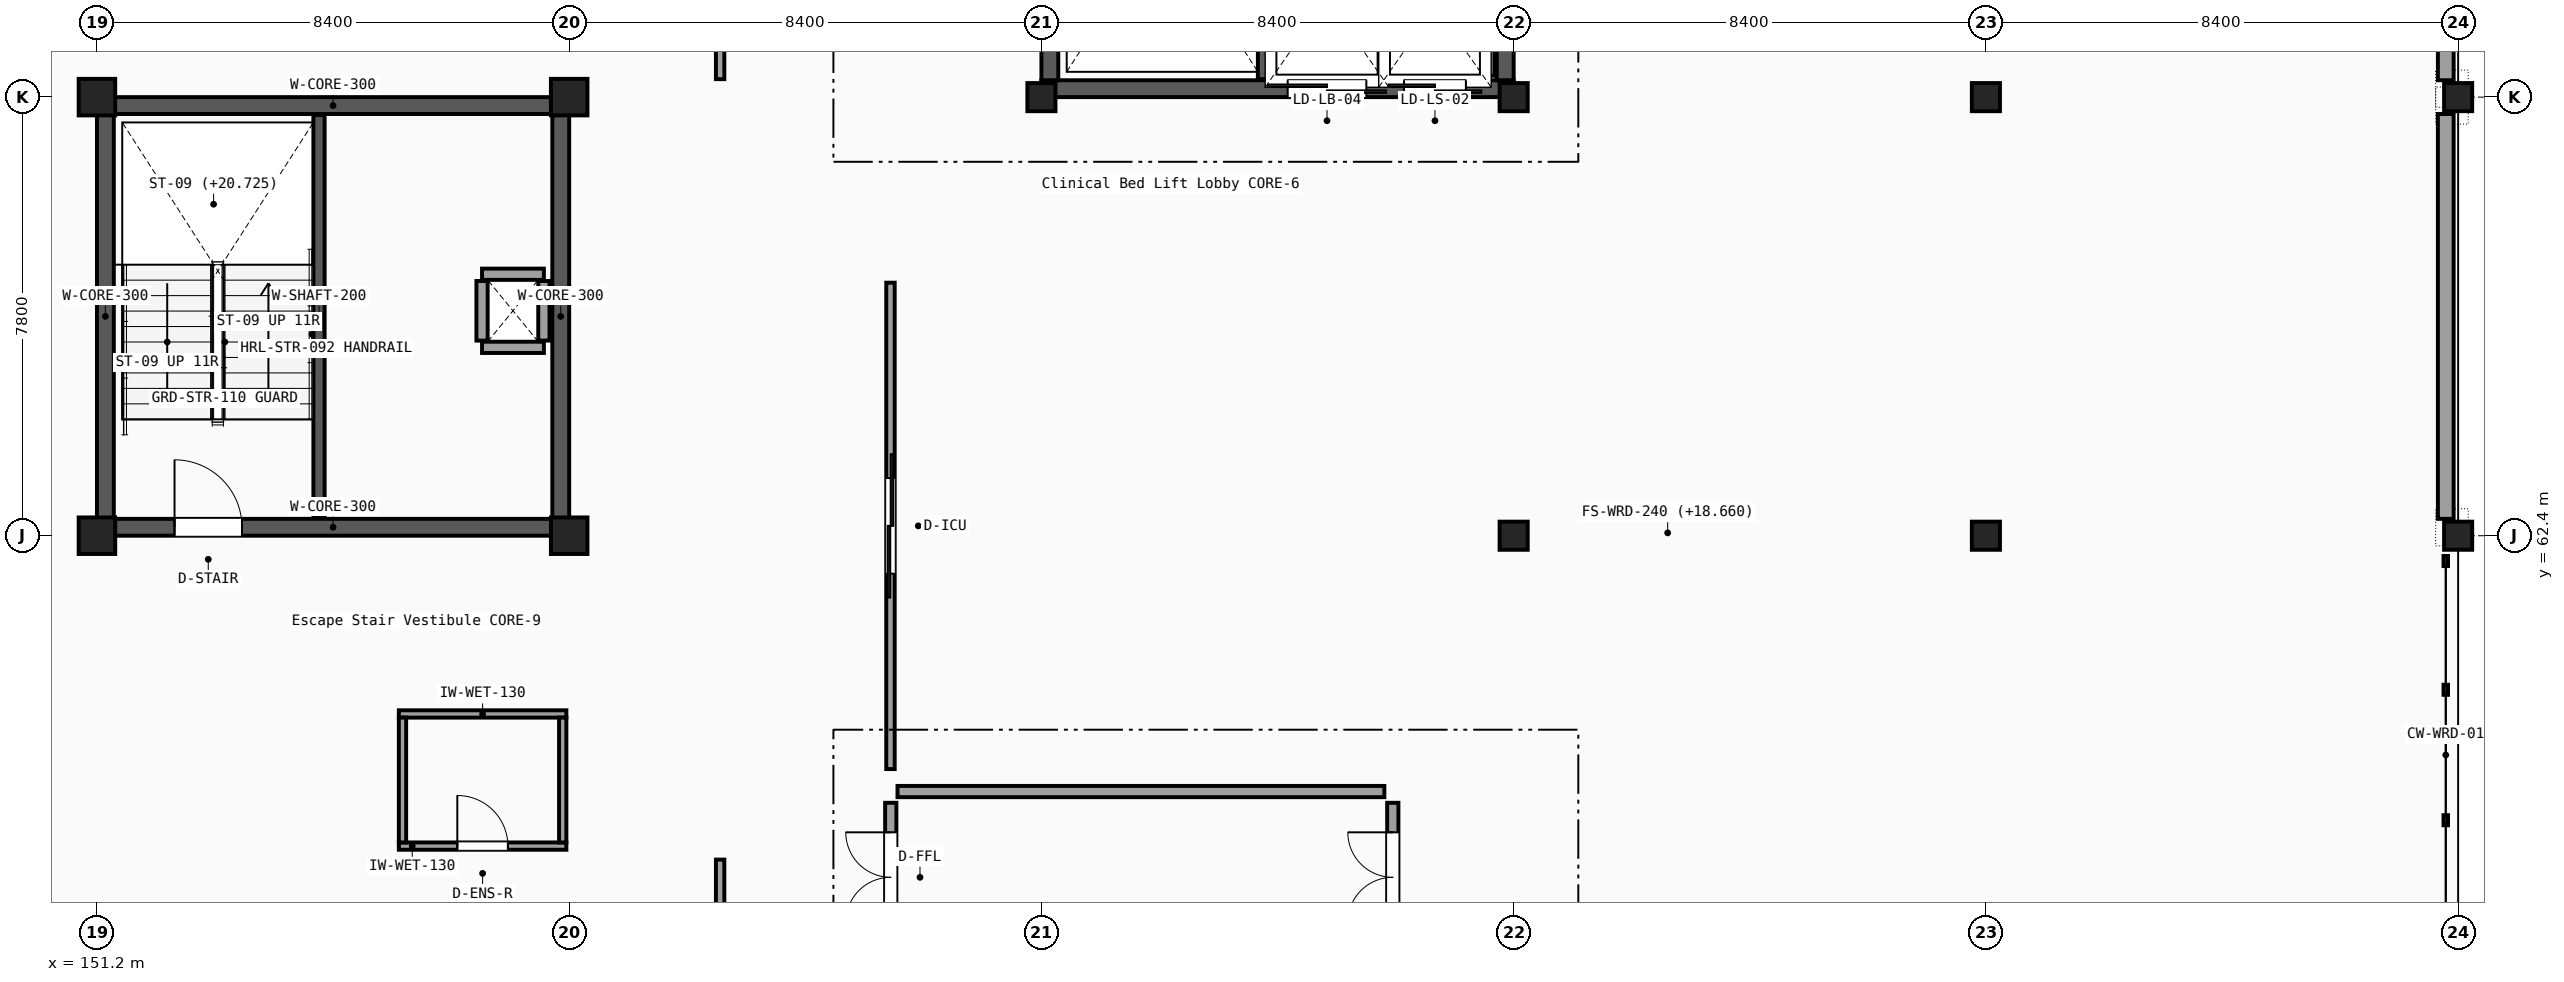
"""IFC4 building model, lengths in metres.
Left out: names, types, materials, properties, quantities, classifications, styles, units other than length and angle.
Written with IfcOpenShell. Run it as: python <this file> out.ifc"""

import sys

from ifc_helpers import new_model, si_unit, direction, frame, frame_2d, origin, origin_2d, place, context, subcontext, project, spatial, rectangle, i_section, extrude, element, fill, save


model = new_model("IFC4")
c1 = context("Model", 3, precision=1e-05, world=origin(), true_north=direction((0.0, 1.0)))
c2 = subcontext(c1, "Body", "Model", "MODEL_VIEW")
j1 = project(units=[si_unit("LENGTHUNIT", "METRE"), si_unit("PLANEANGLEUNIT", "RADIAN")], contexts=[c1])
p1 = place(None, origin())
s1 = spatial("IfcSite", under=j1, at=p1, CompositionType="ELEMENT")
p2 = place(p1, origin())
s2 = spatial("IfcBuilding", under=s1, at=p2, CompositionType="ELEMENT")
p3 = place(p2, frame((0.0, 0.0, 18.9)))
s3 = spatial("IfcBuildingStorey", under=s2, at=p3, CompositionType="ELEMENT", Elevation=18.9)
for number, where, z_axis, x_axis in (
    (1, (151.2, 62.4, 0.0), (0.0, 0.0, 1.0), (1.0, 0.0, 0.0)),
    (2, (151.2, 70.2, 0.0), (0.0, 0.0, 1.0), (1.0, 0.0, 0.0)),
    (3, (159.6, 62.4, 0.0), (0.0, 0.0, 1.0), (1.0, 0.0, 0.0)),
    (4, (159.6, 70.2, 0.0), (0.0, 0.0, 1.0), (1.0, 0.0, 0.0)),
):
    element("IfcColumn", number, at=place(p3, frame(where, z_axis=z_axis, x_axis=x_axis)), inside=s3, PredefinedType="COLUMN", context=c2, shape_type="SweptSolid", body=[
        extrude(rectangle(XDim=0.65, YDim=0.65, at=origin_2d()), origin(), (0.0, 0.0, 1.0), 4.05),
    ])
for number, where, z_axis, x_axis in (
    (5, (168.0, 70.2, 0.0), (0.0, 0.0, 1.0), (1.0, 0.0, 0.0)),
    (6, (176.4, 62.4, 0.0), (0.0, 0.0, 1.0), (1.0, 0.0, 0.0)),
    (7, (176.4, 70.2, 0.0), (0.0, 0.0, 1.0), (1.0, 0.0, 0.0)),
    (8, (184.8, 62.4, 0.0), (0.0, 0.0, 1.0), (1.0, 0.0, 0.0)),
    (9, (184.8, 70.2, 0.0), (0.0, 0.0, 1.0), (1.0, 0.0, 0.0)),
    (10, (193.2, 62.4, 0.0), (0.0, 0.0, 1.0), (1.0, 0.0, 0.0)),
    (11, (193.2, 70.2, 0.0), (0.0, 0.0, 1.0), (1.0, 0.0, 0.0)),
):
    element("IfcColumn", number, at=place(p3, frame(where, z_axis=z_axis, x_axis=x_axis)), inside=s3, PredefinedType="COLUMN", context=c2, shape_type="SweptSolid", body=[
        extrude(i_section(OverallWidth=0.3, OverallDepth=0.5, WebThickness=0.014, FlangeThickness=0.028, FilletRadius=0.027, at=origin_2d()), origin(), (0.0, 0.0, 1.0), 4.05),
    ])
p4 = place(p3, frame((192.98, 62.7, 0.0), z_axis=(0.0, 0.0, 1.0), x_axis=(0.0, 1.0, 0.0)))
e12 = element("IfcWall", 12, at=p4, inside=s3, PredefinedType="SOLIDWALL", context=c2, shape_type="SweptSolid", body=[
    extrude(rectangle(XDim=7.2, YDim=0.28, at=frame_2d((3.6, 0.0))), origin(), (0.0, 0.0, 1.0), 3.25),
])
p5 = place(p3, frame((192.98, 70.5, 0.0), z_axis=(0.0, 0.0, 1.0), x_axis=(0.0, 1.0, 0.0)))
e13 = element("IfcWall", 13, at=p5, inside=s3, PredefinedType="SOLIDWALL", context=c2, shape_type="SweptSolid", body=[
    extrude(rectangle(XDim=7.2, YDim=0.28, at=frame_2d((3.6, 0.0))), origin(), (0.0, 0.0, 1.0), 3.25),
])
p6 = place(p5, frame((2.8, 0.0, 1.15)))
e14 = element("IfcOpeningElement", 14, at=p6, cuts=e13, PredefinedType="OPENING", context=c2, shape_type="SweptSolid", body=[
    extrude(rectangle(XDim=1.6, YDim=1.3, at=frame_2d((0.8, 0.65))), frame((0.0, 0.15, 0.0), z_axis=(0.0, -1.0, 0.0), x_axis=(1.0, 0.0, 0.0)), (0.0, 0.0, 1.0), 0.3),
])
p7 = place(p3, frame((165.44, 57.85, 0.0), z_axis=(0.0, 0.0, 1.0), x_axis=(1.0, 0.0, 0.0)))
e15 = element("IfcWall", 15, at=p7, inside=s3, PredefinedType="PARTITIONING", context=c2, shape_type="SweptSolid", body=[
    extrude(rectangle(XDim=8.66, YDim=0.2, at=frame_2d((4.33, 0.0))), origin(), (0.0, 0.0, 1.0), 3.25),
])
p8 = place(p3, frame((165.32, 55.0, 0.0), z_axis=(0.0, 0.0, 1.0), x_axis=(0.0, 1.0, 0.0)))
e16 = element("IfcWall", 16, at=p8, inside=s3, PredefinedType="PARTITIONING", context=c2, shape_type="SweptSolid", body=[
    extrude(rectangle(XDim=2.65, YDim=0.2, at=frame_2d((1.325, 0.0))), origin(), (0.0, 0.0, 1.0), 3.25),
])
p9 = place(p8, frame((0.525, 0.0, 0.0)))
e17 = element("IfcOpeningElement", 17, at=p9, cuts=e16, PredefinedType="OPENING", context=c2, shape_type="SweptSolid", body=[
    extrude(rectangle(XDim=1.6, YDim=2.2, at=frame_2d((0.8, 1.1))), frame((0.0, 0.11, 0.0), z_axis=(0.0, -1.0, 0.0), x_axis=(1.0, 0.0, 0.0)), (0.0, 0.0, 1.0), 0.22),
])
p10 = place(p3, frame((174.25, 55.0, 0.0), z_axis=(0.0, 0.0, 1.0), x_axis=(0.0, 1.0, 0.0)))
e18 = element("IfcWall", 18, at=p10, inside=s3, PredefinedType="PARTITIONING", context=c2, shape_type="SweptSolid", body=[
    extrude(rectangle(XDim=2.65, YDim=0.2, at=frame_2d((1.325, 0.0))), origin(), (0.0, 0.0, 1.0), 3.25),
])
p11 = place(p10, frame((0.525, 0.0, 0.0)))
e19 = element("IfcOpeningElement", 19, at=p11, cuts=e18, PredefinedType="OPENING", context=c2, shape_type="SweptSolid", body=[
    extrude(rectangle(XDim=1.6, YDim=2.2, at=frame_2d((0.8, 1.1))), frame((0.0, 0.11, 0.0), z_axis=(0.0, -1.0, 0.0), x_axis=(1.0, 0.0, 0.0)), (0.0, 0.0, 1.0), 0.22),
])
p12 = place(p3, frame((168.0, 70.35, 0.0), z_axis=(0.0, 0.0, 1.0), x_axis=(1.0, 0.0, 0.0)))
e20 = element("IfcWall", 20, at=p12, inside=s3, PredefinedType="SHEAR", context=c2, shape_type="SweptSolid", body=[
    extrude(rectangle(XDim=8.4, YDim=0.3, at=frame_2d((4.2, 0.0))), origin(), (0.0, 0.0, 1.0), 3.82),
])
p13 = place(p12, frame((4.38, 0.0, 0.0)))
e21 = element("IfcOpeningElement", 21, at=p13, cuts=e20, PredefinedType="OPENING", context=c2, shape_type="SweptSolid", body=[
    extrude(rectangle(XDim=1.4, YDim=2.2, at=frame_2d((0.7, 1.1))), frame((0.0, 0.16, 0.0), z_axis=(0.0, -1.0, 0.0), x_axis=(1.0, 0.0, 0.0)), (0.0, 0.0, 1.0), 0.32),
])
p14 = place(p12, frame((6.45, 0.0, 0.0)))
e22 = element("IfcOpeningElement", 22, at=p14, cuts=e20, PredefinedType="OPENING", context=c2, shape_type="SweptSolid", body=[
    extrude(rectangle(XDim=1.1, YDim=2.15, at=frame_2d((0.55, 1.075))), frame((0.0, 0.16, 0.0), z_axis=(0.0, -1.0, 0.0), x_axis=(1.0, 0.0, 0.0)), (0.0, 0.0, 1.0), 0.32),
])
for number, where, z_axis, x_axis in (
    (23, (168.15, 70.5, 0.0), (0.0, 0.0, 1.0), (0.0, 1.0, 0.0)),
    (24, (176.25, 70.5, 0.0), (0.0, 0.0, 1.0), (0.0, 1.0, 0.0)),
):
    element("IfcWall", number, at=place(p3, frame(where, z_axis=z_axis, x_axis=x_axis)), inside=s3, PredefinedType="SHEAR", context=c2, shape_type="SweptSolid", body=[
        extrude(rectangle(XDim=7.2, YDim=0.3, at=frame_2d((3.6, 0.0))), origin(), (0.0, 0.0, 1.0), 3.82),
    ])
p15 = place(p3, frame((171.95, 70.52, 0.0), z_axis=(0.0, 0.0, 1.0), x_axis=(0.0, 1.0, 0.0)))
e25 = element("IfcWall", 25, at=p15, inside=s3, PredefinedType="SHEAR", context=c2, shape_type="SweptSolid", body=[
    extrude(rectangle(XDim=7.16, YDim=0.2, at=frame_2d((3.58, 0.0))), origin(), (0.0, 0.0, 1.0), 3.82),
])
p16 = place(p3, frame((174.14, 70.58, 0.0), z_axis=(0.0, 0.0, 1.0), x_axis=(0.0, 1.0, 0.0)))
e26 = element("IfcWall", 26, at=p16, inside=s3, PredefinedType="PARTITIONING", context=c2, shape_type="SweptSolid", body=[
    extrude(rectangle(XDim=2.74, YDim=0.2, at=frame_2d((1.37, 0.0))), origin(), (0.0, 0.0, 1.0), 3.25),
])
p17 = place(p3, frame((175.96, 70.58, 0.0), z_axis=(0.0, 0.0, 1.0), x_axis=(0.0, 1.0, 0.0)))
e27 = element("IfcWall", 27, at=p17, inside=s3, PredefinedType="PARTITIONING", context=c2, shape_type="SweptSolid", body=[
    extrude(rectangle(XDim=2.44, YDim=0.2, at=frame_2d((1.22, 0.0))), origin(), (0.0, 0.0, 1.0), 3.25),
])
p18 = place(p3, frame((151.2, 62.55, 0.0), z_axis=(0.0, 0.0, 1.0), x_axis=(1.0, 0.0, 0.0)))
e28 = element("IfcWall", 28, at=p18, inside=s3, PredefinedType="SHEAR", context=c2, shape_type="SweptSolid", body=[
    extrude(rectangle(XDim=8.4, YDim=0.3, at=frame_2d((4.2, 0.0))), origin(), (0.0, 0.0, 1.0), 3.82),
])
p19 = place(p18, frame((1.38, 0.0, 0.0)))
e29 = element("IfcOpeningElement", 29, at=p19, cuts=e28, PredefinedType="OPENING", context=c2, shape_type="SweptSolid", body=[
    extrude(rectangle(XDim=1.2, YDim=2.15, at=frame_2d((0.6, 1.075))), frame((0.0, 0.16, 0.0), z_axis=(0.0, -1.0, 0.0), x_axis=(1.0, 0.0, 0.0)), (0.0, 0.0, 1.0), 0.32),
])
p20 = place(p3, frame((151.2, 70.05, 0.0), z_axis=(0.0, 0.0, 1.0), x_axis=(1.0, 0.0, 0.0)))
e30 = element("IfcWall", 30, at=p20, inside=s3, PredefinedType="SHEAR", context=c2, shape_type="SweptSolid", body=[
    extrude(rectangle(XDim=8.4, YDim=0.3, at=frame_2d((4.2, 0.0))), origin(), (0.0, 0.0, 1.0), 3.82),
])
for number, where, z_axis, x_axis in (
    (31, (151.35, 62.7, 0.0), (0.0, 0.0, 1.0), (0.0, 1.0, 0.0)),
    (32, (159.45, 62.7, 0.0), (0.0, 0.0, 1.0), (0.0, 1.0, 0.0)),
):
    element("IfcWall", number, at=place(p3, frame(where, z_axis=z_axis, x_axis=x_axis)), inside=s3, PredefinedType="SHEAR", context=c2, shape_type="SweptSolid", body=[
        extrude(rectangle(XDim=7.2, YDim=0.3, at=frame_2d((3.6, 0.0))), origin(), (0.0, 0.0, 1.0), 3.82),
    ])
p21 = place(p3, frame((155.15, 62.72, 0.0), z_axis=(0.0, 0.0, 1.0), x_axis=(0.0, 1.0, 0.0)))
e33 = element("IfcWall", 33, at=p21, inside=s3, PredefinedType="SHEAR", context=c2, shape_type="SweptSolid", body=[
    extrude(rectangle(XDim=7.16, YDim=0.2, at=frame_2d((3.58, 0.0))), origin(), (0.0, 0.0, 1.0), 3.82),
])
for number, where, z_axis, x_axis in (
    (34, (158.05, 65.75, 0.0), (0.0, 0.0, 1.0), (1.0, 0.0, 0.0)),
    (35, (158.05, 67.05, 0.0), (0.0, 0.0, 1.0), (1.0, 0.0, 0.0)),
):
    element("IfcWall", number, at=place(p3, frame(where, z_axis=z_axis, x_axis=x_axis)), inside=s3, PredefinedType="PARTITIONING", context=c2, shape_type="SweptSolid", body=[
        extrude(rectangle(XDim=1.1, YDim=0.2, at=frame_2d((0.55, 0.0))), origin(), (0.0, 0.0, 1.0), 3.25),
    ])
for number, where, z_axis, x_axis in (
    (36, (158.05, 65.87, 0.0), (0.0, 0.0, 1.0), (0.0, 1.0, 0.0)),
    (37, (159.15, 65.87, 0.0), (0.0, 0.0, 1.0), (0.0, 1.0, 0.0)),
):
    element("IfcWall", number, at=place(p3, frame(where, z_axis=z_axis, x_axis=x_axis)), inside=s3, PredefinedType="PARTITIONING", context=c2, shape_type="SweptSolid", body=[
        extrude(rectangle(XDim=1.06, YDim=0.2, at=frame_2d((0.53, 0.0))), origin(), (0.0, 0.0, 1.0), 3.25),
    ])
p22 = place(p3, frame((162.285, 47.42, 0.0), z_axis=(0.0, 0.0, 1.0), x_axis=(0.0, 1.0, 0.0)))
e38 = element("IfcWall", 38, at=p22, inside=s3, PredefinedType="PARTITIONING", context=c2, shape_type="SweptSolid", body=[
    extrude(rectangle(XDim=9.22, YDim=0.15, at=frame_2d((4.61, 0.0))), origin(), (0.0, 0.0, 1.0), 3.25),
])
p23 = place(p22, frame((3.91, 0.0, 0.0)))
e39 = element("IfcOpeningElement", 39, at=p23, cuts=e38, PredefinedType="OPENING", context=c2, shape_type="SweptSolid", body=[
    extrude(rectangle(XDim=1.4, YDim=2.2, at=frame_2d((0.7, 1.1))), frame((0.0, 0.085, 0.0), z_axis=(0.0, -1.0, 0.0), x_axis=(1.0, 0.0, 0.0)), (0.0, 0.0, 1.0), 0.17),
])
p24 = place(p3, frame((156.57, 56.88, 0.0), z_axis=(0.0, 0.0, 1.0), x_axis=(1.0, 0.0, 0.0)))
e40 = element("IfcWall", 40, at=p24, inside=s3, PredefinedType="PARTITIONING", context=c2, shape_type="SweptSolid", body=[
    extrude(rectangle(XDim=2.98, YDim=0.13, at=frame_2d((1.49, 0.0))), origin(), (0.0, 0.0, 1.0), 3.53),
])
p25 = place(p24, frame((1.04, 0.0, 0.0)))
e41 = element("IfcOpeningElement", 41, at=p25, cuts=e40, PredefinedType="OPENING", context=c2, shape_type="SweptSolid", body=[
    extrude(rectangle(XDim=0.9, YDim=2.1, at=frame_2d((0.45, 1.05))), frame((0.0, 0.075, 0.0), z_axis=(0.0, -1.0, 0.0), x_axis=(1.0, 0.0, 0.0)), (0.0, 0.0, 1.0), 0.15),
])
p26 = place(p3, frame((156.57, 59.23, 0.0), z_axis=(0.0, 0.0, 1.0), x_axis=(1.0, 0.0, 0.0)))
e42 = element("IfcWall", 42, at=p26, inside=s3, PredefinedType="PARTITIONING", context=c2, shape_type="SweptSolid", body=[
    extrude(rectangle(XDim=2.98, YDim=0.13, at=frame_2d((1.49, 0.0))), origin(), (0.0, 0.0, 1.0), 3.53),
])
p27 = place(p3, frame((156.635, 56.945, 0.0), z_axis=(0.0, 0.0, 1.0), x_axis=(0.0, 1.0, 0.0)))
e43 = element("IfcWall", 43, at=p27, inside=s3, PredefinedType="PARTITIONING", context=c2, shape_type="SweptSolid", body=[
    extrude(rectangle(XDim=2.22, YDim=0.13, at=frame_2d((1.11, 0.0))), origin(), (0.0, 0.0, 1.0), 3.77),
])
p28 = place(p3, frame((159.485, 56.945, 0.0), z_axis=(0.0, 0.0, 1.0), x_axis=(0.0, 1.0, 0.0)))
e44 = element("IfcWall", 44, at=p28, inside=s3, PredefinedType="PARTITIONING", context=c2, shape_type="SweptSolid", body=[
    extrude(rectangle(XDim=2.22, YDim=0.13, at=frame_2d((1.11, 0.0))), origin(), (0.0, 0.0, 1.0), 3.53),
])
p29 = place(p3, frame((162.285, 70.52, 0.0), z_axis=(0.0, 0.0, 1.0), x_axis=(0.0, 1.0, 0.0)))
e45 = element("IfcWall", 45, at=p29, inside=s3, PredefinedType="PARTITIONING", context=c2, shape_type="SweptSolid", body=[
    extrude(rectangle(XDim=11.07, YDim=0.15, at=frame_2d((5.535, 0.0))), origin(), (0.0, 0.0, 1.0), 3.25),
])
p30 = place(p29, frame((4.685, 0.0, 0.0)))
e46 = element("IfcOpeningElement", 46, at=p30, cuts=e45, PredefinedType="OPENING", context=c2, shape_type="SweptSolid", body=[
    extrude(rectangle(XDim=1.7, YDim=2.3, at=frame_2d((0.85, 1.15))), frame((0.0, 0.085, 0.0), z_axis=(0.0, -1.0, 0.0), x_axis=(1.0, 0.0, 0.0)), (0.0, 0.0, 1.0), 0.17),
])
p31 = place(p3, frame((165.315, 58.25, 0.0), z_axis=(0.0, 0.0, 1.0), x_axis=(0.0, 1.0, 0.0)))
e47 = element("IfcWall", 47, at=p31, inside=s3, PredefinedType="PARTITIONING", context=c2, shape_type="SweptSolid", body=[
    extrude(rectangle(XDim=8.65, YDim=0.15, at=frame_2d((4.325, 0.0))), origin(), (0.0, 0.0, 1.0), 3.25),
])
p32 = place(p31, frame((3.475, 0.0, 0.0)))
e48 = element("IfcOpeningElement", 48, at=p32, cuts=e47, PredefinedType="OPENING", context=c2, shape_type="SweptSolid", body=[
    extrude(rectangle(XDim=1.7, YDim=2.3, at=frame_2d((0.85, 1.15))), frame((0.0, 0.085, 0.0), z_axis=(0.0, -1.0, 0.0), x_axis=(1.0, 0.0, 0.0)), (0.0, 0.0, 1.0), 0.17),
])
p33 = place(p9, origin())
e49 = element("IfcDoor", 49, at=p33, inside=s3, OperationType="DOUBLE_DOOR_SINGLE_SWING", PredefinedType="DOOR", context=c2, shape_type="SweptSolid", body=[
    extrude(rectangle(XDim=1.6, YDim=2.2, at=frame_2d((0.8, 1.1))), frame((0.0, 0.025, 0.0), z_axis=(0.0, -1.0, 0.0), x_axis=(1.0, 0.0, 0.0)), (0.0, 0.0, 1.0), 0.05),
])
fill(e17, e49)
p34 = place(p11, origin())
e50 = element("IfcDoor", 50, at=p34, inside=s3, OperationType="DOUBLE_DOOR_SINGLE_SWING", PredefinedType="DOOR", context=c2, shape_type="SweptSolid", body=[
    extrude(rectangle(XDim=1.6, YDim=2.2, at=frame_2d((0.8, 1.1))), frame((0.0, 0.025, 0.0), z_axis=(0.0, -1.0, 0.0), x_axis=(1.0, 0.0, 0.0)), (0.0, 0.0, 1.0), 0.05),
])
fill(e19, e50)
p35 = place(p13, origin())
e51 = element("IfcDoor", 51, at=p35, inside=s3, OperationType="DOUBLE_DOOR_SLIDING", PredefinedType="DOOR", context=c2, shape_type="SweptSolid", body=[
    extrude(rectangle(XDim=1.4, YDim=2.2, at=frame_2d((0.7, 1.1))), frame((0.0, 0.025, 0.0), z_axis=(0.0, -1.0, 0.0), x_axis=(1.0, 0.0, 0.0)), (0.0, 0.0, 1.0), 0.05),
])
fill(e21, e51)
p36 = place(p14, origin())
e52 = element("IfcDoor", 52, at=p36, inside=s3, OperationType="DOUBLE_DOOR_SLIDING", PredefinedType="DOOR", context=c2, shape_type="SweptSolid", body=[
    extrude(rectangle(XDim=1.1, YDim=2.15, at=frame_2d((0.55, 1.075))), frame((0.0, 0.025, 0.0), z_axis=(0.0, -1.0, 0.0), x_axis=(1.0, 0.0, 0.0)), (0.0, 0.0, 1.0), 0.05),
])
fill(e22, e52)
p37 = place(p19, origin())
e53 = element("IfcDoor", 53, at=p37, inside=s3, OperationType="SINGLE_SWING_LEFT", PredefinedType="DOOR", context=c2, shape_type="SweptSolid", body=[
    extrude(rectangle(XDim=1.2, YDim=2.15, at=frame_2d((0.6, 1.075))), frame((0.0, 0.025, 0.0), z_axis=(0.0, -1.0, 0.0), x_axis=(1.0, 0.0, 0.0)), (0.0, 0.0, 1.0), 0.05),
])
fill(e29, e53)
p38 = place(p25, origin())
e54 = element("IfcDoor", 54, at=p38, inside=s3, OperationType="SINGLE_SWING_LEFT", PredefinedType="DOOR", context=c2, shape_type="SweptSolid", body=[
    extrude(rectangle(XDim=0.9, YDim=2.1, at=frame_2d((0.45, 1.05))), frame((0.0, 0.025, 0.0), z_axis=(0.0, -1.0, 0.0), x_axis=(1.0, 0.0, 0.0)), (0.0, 0.0, 1.0), 0.05),
])
fill(e41, e54)
p39 = place(p32, origin())
e55 = element("IfcDoor", 55, at=p39, inside=s3, OperationType="DOUBLE_DOOR_SLIDING", PredefinedType="DOOR", context=c2, shape_type="SweptSolid", body=[
    extrude(rectangle(XDim=1.7, YDim=2.3, at=frame_2d((0.85, 1.15))), frame((0.0, 0.025, 0.0), z_axis=(0.0, -1.0, 0.0), x_axis=(1.0, 0.0, 0.0)), (0.0, 0.0, 1.0), 0.05),
])
fill(e48, e55)
save(model, sys.argv[1])
